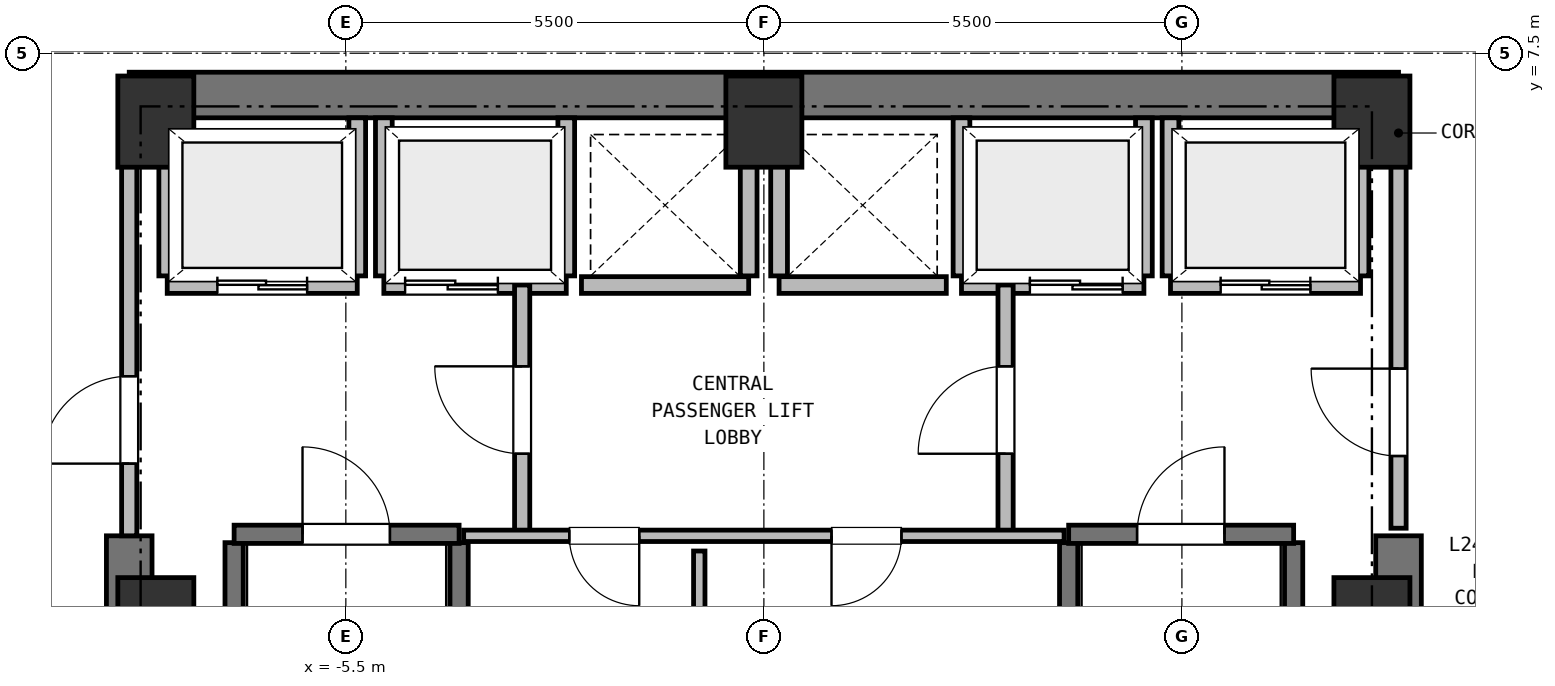
"""IFC4 building model, lengths in metres.
Left out: names, types, materials, properties, quantities, classifications, styles, units other than length and angle.
Written with IfcOpenShell. Run it as: python <this file> out.ifc"""

import sys

from ifc_helpers import new_model, si_unit, direction, frame, frame_2d, origin, origin_2d, place, context, subcontext, project, spatial, rectangle, extrude, element, fill, save


model = new_model("IFC4")
c1 = context("Model", 3, precision=1e-05, world=origin(), true_north=direction((0.0, 1.0)))
c2 = subcontext(c1, "Body", "Model", "MODEL_VIEW")
j1 = project(units=[si_unit("LENGTHUNIT", "METRE"), si_unit("PLANEANGLEUNIT", "RADIAN")], contexts=[c1])
p1 = place(None, origin())
s1 = spatial("IfcSite", under=j1, at=p1, CompositionType="ELEMENT")
p2 = place(p1, origin())
s2 = spatial("IfcBuilding", under=s1, at=p2, CompositionType="ELEMENT")
p3 = place(p2, frame((0.0, 0.0, 101.0)))
s3 = spatial("IfcBuildingStorey", under=s2, at=p3, CompositionType="ELEMENT", Elevation=101.0)
for number, where, z_axis, x_axis in (
    (1, (8.0, 0.0, 0.0), (0.0, 0.0, 1.0), (1.0, 0.0, 0.0)),
    (2, (8.0, 6.6, 0.0), (0.0, 0.0, 1.0), (1.0, 0.0, 0.0)),
    (3, (0.0, 6.6, 0.0), (0.0, 0.0, 1.0), (1.0, 0.0, 0.0)),
    (4, (-8.0, 6.6, 0.0), (0.0, 0.0, 1.0), (1.0, 0.0, 0.0)),
    (5, (-8.0, 0.0, 0.0), (0.0, 0.0, 1.0), (1.0, 0.0, 0.0)),
):
    element("IfcColumn", number, at=place(p3, frame(where, z_axis=z_axis, x_axis=x_axis)), inside=s3, PredefinedType="COLUMN", context=c2, shape_type="SweptSolid", body=[
        extrude(rectangle(XDim=1.0, YDim=1.2, at=origin_2d()), origin(), (0.0, 0.0, 1.0), 3.75),
    ])
p4 = place(p3, frame((-8.35, 6.95, 0.0), z_axis=(0.0, 0.0, 1.0), x_axis=(1.0, 0.0, 0.0)))
e6 = element("IfcWall", 6, at=p4, inside=s3, PredefinedType="SHEAR", context=c2, shape_type="SweptSolid", body=[
    extrude(rectangle(XDim=16.7, YDim=0.6, at=frame_2d((8.35, 0.0))), origin(), (0.0, 0.0, 1.0), 3.5),
])
for number, where, z_axis, x_axis in (
    (7, (-8.35, -6.95, 0.0), (0.0, 0.0, 1.0), (0.0, 1.0, 0.0)),
    (8, (8.35, -6.95, 0.0), (0.0, 0.0, 1.0), (0.0, 1.0, 0.0)),
):
    element("IfcWall", number, at=place(p3, frame(where, z_axis=z_axis, x_axis=x_axis)), inside=s3, PredefinedType="SHEAR", context=c2, shape_type="SweptSolid", body=[
        extrude(rectangle(XDim=8.1, YDim=0.6, at=frame_2d((4.05, 0.0))), origin(), (0.0, 0.0, 1.0), 3.5),
    ])
for number, where, z_axis, x_axis in (
    (9, (-6.97, -6.16, 0.0), (0.0, 0.0, 1.0), (0.0, 1.0, 0.0)),
    (10, (-4.01, -6.16, 0.0), (0.0, 0.0, 1.0), (0.0, 1.0, 0.0)),
):
    element("IfcWall", number, at=place(p3, frame(where, z_axis=z_axis, x_axis=x_axis)), inside=s3, PredefinedType="SHEAR", context=c2, shape_type="SweptSolid", body=[
        extrude(rectangle(XDim=7.22, YDim=0.24, at=frame_2d((3.61, 0.0))), origin(), (0.0, 0.0, 1.0), 3.5),
    ])
p5 = place(p3, frame((-6.97, 1.17, 0.0), z_axis=(0.0, 0.0, 1.0), x_axis=(1.0, 0.0, 0.0)))
e11 = element("IfcWall", 11, at=p5, inside=s3, PredefinedType="SHEAR", context=c2, shape_type="SweptSolid", body=[
    extrude(rectangle(XDim=2.96, YDim=0.24, at=frame_2d((1.48, 0.0))), origin(), (0.0, 0.0, 1.0), 3.5),
])
p6 = place(p5, frame((0.9, 0.0, 0.0)))
e12 = element("IfcOpeningElement", 12, at=p6, cuts=e11, PredefinedType="OPENING", context=c2, shape_type="SweptSolid", body=[
    extrude(rectangle(XDim=1.15, YDim=2.15, at=frame_2d((0.575, 1.075))), frame((0.0, 0.13, 0.0), z_axis=(0.0, -1.0, 0.0), x_axis=(1.0, 0.0, 0.0)), (0.0, 0.0, 1.0), 0.26),
])
for number, where, z_axis, x_axis in (
    (13, (4.01, -6.16, 0.0), (0.0, 0.0, 1.0), (0.0, 1.0, 0.0)),
    (14, (6.97, -6.16, 0.0), (0.0, 0.0, 1.0), (0.0, 1.0, 0.0)),
):
    element("IfcWall", number, at=place(p3, frame(where, z_axis=z_axis, x_axis=x_axis)), inside=s3, PredefinedType="SHEAR", context=c2, shape_type="SweptSolid", body=[
        extrude(rectangle(XDim=7.22, YDim=0.24, at=frame_2d((3.61, 0.0))), origin(), (0.0, 0.0, 1.0), 3.5),
    ])
p7 = place(p3, frame((4.01, 1.17, 0.0), z_axis=(0.0, 0.0, 1.0), x_axis=(1.0, 0.0, 0.0)))
e15 = element("IfcWall", 15, at=p7, inside=s3, PredefinedType="SHEAR", context=c2, shape_type="SweptSolid", body=[
    extrude(rectangle(XDim=2.96, YDim=0.24, at=frame_2d((1.48, 0.0))), origin(), (0.0, 0.0, 1.0), 3.5),
])
p8 = place(p7, frame((0.9, 0.0, 0.0)))
e16 = element("IfcOpeningElement", 16, at=p8, cuts=e15, PredefinedType="OPENING", context=c2, shape_type="SweptSolid", body=[
    extrude(rectangle(XDim=1.15, YDim=2.15, at=frame_2d((0.575, 1.075))), frame((0.0, 0.13, 0.0), z_axis=(0.0, -1.0, 0.0), x_axis=(1.0, 0.0, 0.0)), (0.0, 0.0, 1.0), 0.26),
])
p9 = place(p3, frame((-7.85, 4.45, 0.0), z_axis=(0.0, 0.0, 1.0), x_axis=(1.0, 0.0, 0.0)))
e17 = element("IfcWall", 17, at=p9, inside=s3, PredefinedType="PARTITIONING", context=c2, shape_type="SweptSolid", body=[
    extrude(rectangle(XDim=2.5, YDim=0.22, at=frame_2d((1.25, 0.0))), origin(), (0.0, 0.0, 1.0), 3.5),
])
p10 = place(p9, frame((0.66, 0.0, 0.0)))
e18 = element("IfcOpeningElement", 18, at=p10, cuts=e17, PredefinedType="OPENING", context=c2, shape_type="SweptSolid", body=[
    extrude(rectangle(XDim=1.18, YDim=2.15, at=frame_2d((0.59, 1.075))), frame((0.0, 0.12, 0.0), z_axis=(0.0, -1.0, 0.0), x_axis=(1.0, 0.0, 0.0)), (0.0, 0.0, 1.0), 0.24),
])
p11 = place(p3, frame((-7.85, 4.57, 0.0), z_axis=(0.0, 0.0, 1.0), x_axis=(0.0, 1.0, 0.0)))
e19 = element("IfcWall", 19, at=p11, inside=s3, PredefinedType="PARTITIONING", context=c2, shape_type="SweptSolid", body=[
    extrude(rectangle(XDim=2.08, YDim=0.22, at=frame_2d((1.04, 0.0))), origin(), (0.0, 0.0, 1.0), 3.12),
])
p12 = place(p3, frame((-5.35, 4.57, 0.0), z_axis=(0.0, 0.0, 1.0), x_axis=(0.0, 1.0, 0.0)))
e20 = element("IfcWall", 20, at=p12, inside=s3, PredefinedType="PARTITIONING", context=c2, shape_type="SweptSolid", body=[
    extrude(rectangle(XDim=2.08, YDim=0.22, at=frame_2d((1.04, 0.0))), origin(), (0.0, 0.0, 1.0), 3.5),
])
p13 = place(p3, frame((5.35, 4.45, 0.0), z_axis=(0.0, 0.0, 1.0), x_axis=(1.0, 0.0, 0.0)))
e21 = element("IfcWall", 21, at=p13, inside=s3, PredefinedType="PARTITIONING", context=c2, shape_type="SweptSolid", body=[
    extrude(rectangle(XDim=2.5, YDim=0.22, at=frame_2d((1.25, 0.0))), origin(), (0.0, 0.0, 1.0), 3.5),
])
p14 = place(p13, frame((0.66, 0.0, 0.0)))
e22 = element("IfcOpeningElement", 22, at=p14, cuts=e21, PredefinedType="OPENING", context=c2, shape_type="SweptSolid", body=[
    extrude(rectangle(XDim=1.18, YDim=2.15, at=frame_2d((0.59, 1.075))), frame((0.0, 0.12, 0.0), z_axis=(0.0, -1.0, 0.0), x_axis=(1.0, 0.0, 0.0)), (0.0, 0.0, 1.0), 0.24),
])
p15 = place(p3, frame((5.35, 4.57, 0.0), z_axis=(0.0, 0.0, 1.0), x_axis=(0.0, 1.0, 0.0)))
e23 = element("IfcWall", 23, at=p15, inside=s3, PredefinedType="PARTITIONING", context=c2, shape_type="SweptSolid", body=[
    extrude(rectangle(XDim=2.08, YDim=0.22, at=frame_2d((1.04, 0.0))), origin(), (0.0, 0.0, 1.0), 3.5),
])
p16 = place(p3, frame((7.85, 4.57, 0.0), z_axis=(0.0, 0.0, 1.0), x_axis=(0.0, 1.0, 0.0)))
e24 = element("IfcWall", 24, at=p16, inside=s3, PredefinedType="PARTITIONING", context=c2, shape_type="SweptSolid", body=[
    extrude(rectangle(XDim=2.08, YDim=0.22, at=frame_2d((1.04, 0.0))), origin(), (0.0, 0.0, 1.0), 3.12),
])
p17 = place(p3, frame((-5.0, 4.45, 0.0), z_axis=(0.0, 0.0, 1.0), x_axis=(1.0, 0.0, 0.0)))
e25 = element("IfcWall", 25, at=p17, inside=s3, PredefinedType="PARTITIONING", context=c2, shape_type="SweptSolid", body=[
    extrude(rectangle(XDim=2.4, YDim=0.22, at=frame_2d((1.2, 0.0))), origin(), (0.0, 0.0, 1.0), 3.5),
])
p18 = place(p17, frame((0.28, 0.0, 0.0)))
e26 = element("IfcOpeningElement", 26, at=p18, cuts=e25, PredefinedType="OPENING", context=c2, shape_type="SweptSolid", body=[
    extrude(rectangle(XDim=1.22, YDim=2.15, at=frame_2d((0.61, 1.075))), frame((0.0, 0.12, 0.0), z_axis=(0.0, -1.0, 0.0), x_axis=(1.0, 0.0, 0.0)), (0.0, 0.0, 1.0), 0.24),
])
for number, where, z_axis, x_axis in (
    (27, (-5.0, 4.57, 0.0), (0.0, 0.0, 1.0), (0.0, 1.0, 0.0)),
    (28, (-2.6, 4.57, 0.0), (0.0, 0.0, 1.0), (0.0, 1.0, 0.0)),
):
    element("IfcWall", number, at=place(p3, frame(where, z_axis=z_axis, x_axis=x_axis)), inside=s3, PredefinedType="PARTITIONING", context=c2, shape_type="SweptSolid", body=[
        extrude(rectangle(XDim=2.08, YDim=0.22, at=frame_2d((1.04, 0.0))), origin(), (0.0, 0.0, 1.0), 3.5),
    ])
p19 = place(p3, frame((2.6, 4.45, 0.0), z_axis=(0.0, 0.0, 1.0), x_axis=(1.0, 0.0, 0.0)))
e29 = element("IfcWall", 29, at=p19, inside=s3, PredefinedType="PARTITIONING", context=c2, shape_type="SweptSolid", body=[
    extrude(rectangle(XDim=2.4, YDim=0.22, at=frame_2d((1.2, 0.0))), origin(), (0.0, 0.0, 1.0), 3.5),
])
p20 = place(p19, frame((0.9, 0.0, 0.0)))
e30 = element("IfcOpeningElement", 30, at=p20, cuts=e29, PredefinedType="OPENING", context=c2, shape_type="SweptSolid", body=[
    extrude(rectangle(XDim=1.22, YDim=2.15, at=frame_2d((0.61, 1.075))), frame((0.0, 0.12, 0.0), z_axis=(0.0, -1.0, 0.0), x_axis=(1.0, 0.0, 0.0)), (0.0, 0.0, 1.0), 0.24),
])
for number, where, z_axis, x_axis in (
    (31, (2.6, 4.57, 0.0), (0.0, 0.0, 1.0), (0.0, 1.0, 0.0)),
    (32, (5.0, 4.57, 0.0), (0.0, 0.0, 1.0), (0.0, 1.0, 0.0)),
):
    element("IfcWall", number, at=place(p3, frame(where, z_axis=z_axis, x_axis=x_axis)), inside=s3, PredefinedType="PARTITIONING", context=c2, shape_type="SweptSolid", body=[
        extrude(rectangle(XDim=2.08, YDim=0.22, at=frame_2d((1.04, 0.0))), origin(), (0.0, 0.0, 1.0), 3.5),
    ])
p21 = place(p3, frame((-2.4, 4.45, 0.0), z_axis=(0.0, 0.0, 1.0), x_axis=(1.0, 0.0, 0.0)))
e33 = element("IfcWall", 33, at=p21, inside=s3, PredefinedType="PARTITIONING", context=c2, shape_type="SweptSolid", body=[
    extrude(rectangle(XDim=2.2, YDim=0.22, at=frame_2d((1.1, 0.0))), origin(), (0.0, 0.0, 1.0), 3.5),
])
p22 = place(p3, frame((-0.2, 4.57, 0.0), z_axis=(0.0, 0.0, 1.0), x_axis=(0.0, 1.0, 0.0)))
e34 = element("IfcWall", 34, at=p22, inside=s3, PredefinedType="PARTITIONING", context=c2, shape_type="SweptSolid", body=[
    extrude(rectangle(XDim=2.08, YDim=0.22, at=frame_2d((1.04, 0.0))), origin(), (0.0, 0.0, 1.0), 3.5),
])
p23 = place(p3, frame((0.2, 4.45, 0.0), z_axis=(0.0, 0.0, 1.0), x_axis=(1.0, 0.0, 0.0)))
e35 = element("IfcWall", 35, at=p23, inside=s3, PredefinedType="PARTITIONING", context=c2, shape_type="SweptSolid", body=[
    extrude(rectangle(XDim=2.2, YDim=0.22, at=frame_2d((1.1, 0.0))), origin(), (0.0, 0.0, 1.0), 3.5),
])
p24 = place(p3, frame((0.2, 4.57, 0.0), z_axis=(0.0, 0.0, 1.0), x_axis=(0.0, 1.0, 0.0)))
e36 = element("IfcWall", 36, at=p24, inside=s3, PredefinedType="PARTITIONING", context=c2, shape_type="SweptSolid", body=[
    extrude(rectangle(XDim=2.08, YDim=0.22, at=frame_2d((1.04, 0.0))), origin(), (0.0, 0.0, 1.0), 3.5),
])
p25 = place(p3, frame((-3.18, 1.15, 0.0), z_axis=(0.0, 0.0, 1.0), x_axis=(0.0, 1.0, 0.0)))
e37 = element("IfcWall", 37, at=p25, inside=s3, PredefinedType="PARTITIONING", context=c2, shape_type="SweptSolid", body=[
    extrude(rectangle(XDim=3.3, YDim=0.2, at=frame_2d((1.65, 0.0))), origin(), (0.0, 0.0, 1.0), 3.5),
])
p26 = place(p25, frame((1.08, 0.0, 0.0)))
e38 = element("IfcOpeningElement", 38, at=p26, cuts=e37, PredefinedType="OPENING", context=c2, shape_type="SweptSolid", body=[
    extrude(rectangle(XDim=1.15, YDim=2.15, at=frame_2d((0.575, 1.075))), frame((0.0, 0.11, 0.0), z_axis=(0.0, -1.0, 0.0), x_axis=(1.0, 0.0, 0.0)), (0.0, 0.0, 1.0), 0.22),
])
p27 = place(p3, frame((3.18, 1.15, 0.0), z_axis=(0.0, 0.0, 1.0), x_axis=(0.0, 1.0, 0.0)))
e39 = element("IfcWall", 39, at=p27, inside=s3, PredefinedType="PARTITIONING", context=c2, shape_type="SweptSolid", body=[
    extrude(rectangle(XDim=3.3, YDim=0.2, at=frame_2d((1.65, 0.0))), origin(), (0.0, 0.0, 1.0), 3.5),
])
p28 = place(p27, frame((1.08, 0.0, 0.0)))
e40 = element("IfcOpeningElement", 40, at=p28, cuts=e39, PredefinedType="OPENING", context=c2, shape_type="SweptSolid", body=[
    extrude(rectangle(XDim=1.15, YDim=2.15, at=frame_2d((0.575, 1.075))), frame((0.0, 0.11, 0.0), z_axis=(0.0, -1.0, 0.0), x_axis=(1.0, 0.0, 0.0)), (0.0, 0.0, 1.0), 0.22),
])
p29 = place(p3, frame((-8.35, 1.15, 0.0), z_axis=(0.0, 0.0, 1.0), x_axis=(0.0, 1.0, 0.0)))
e41 = element("IfcWall", 41, at=p29, inside=s3, PredefinedType="PARTITIONING", context=c2, shape_type="SweptSolid", body=[
    extrude(rectangle(XDim=5.4, YDim=0.2, at=frame_2d((2.7, 0.0))), origin(), (0.0, 0.0, 1.0), 3.5),
])
p30 = place(p29, frame((0.95, 0.0, 0.0)))
e42 = element("IfcOpeningElement", 42, at=p30, cuts=e41, PredefinedType="OPENING", context=c2, shape_type="SweptSolid", body=[
    extrude(rectangle(XDim=1.15, YDim=2.15, at=frame_2d((0.575, 1.075))), frame((0.0, 0.11, 0.0), z_axis=(0.0, -1.0, 0.0), x_axis=(1.0, 0.0, 0.0)), (0.0, 0.0, 1.0), 0.22),
])
p31 = place(p3, frame((8.35, 1.25, 0.0), z_axis=(0.0, 0.0, 1.0), x_axis=(0.0, 1.0, 0.0)))
e43 = element("IfcWall", 43, at=p31, inside=s3, PredefinedType="PARTITIONING", context=c2, shape_type="SweptSolid", body=[
    extrude(rectangle(XDim=5.3, YDim=0.2, at=frame_2d((2.65, 0.0))), origin(), (0.0, 0.0, 1.0), 3.5),
])
p32 = place(p31, frame((0.95, 0.0, 0.0)))
e44 = element("IfcOpeningElement", 44, at=p32, cuts=e43, PredefinedType="OPENING", context=c2, shape_type="SweptSolid", body=[
    extrude(rectangle(XDim=1.15, YDim=2.15, at=frame_2d((0.575, 1.075))), frame((0.0, 0.11, 0.0), z_axis=(0.0, -1.0, 0.0), x_axis=(1.0, 0.0, 0.0)), (0.0, 0.0, 1.0), 0.22),
])
p33 = place(p3, frame((3.95, 1.15, 0.0), z_axis=(0.0, 0.0, 1.0), x_axis=(-1.0, 0.0, 0.0)))
e45 = element("IfcWall", 45, at=p33, inside=s3, PredefinedType="PARTITIONING", context=c2, shape_type="SweptSolid", body=[
    extrude(rectangle(XDim=7.9, YDim=0.15, at=frame_2d((3.95, 0.0))), origin(), (0.0, 0.0, 1.0), 3.5),
])
p34 = place(p33, frame((5.59, 0.0, 0.0)))
e46 = element("IfcOpeningElement", 46, at=p34, cuts=e45, PredefinedType="OPENING", context=c2, shape_type="SweptSolid", body=[
    extrude(rectangle(XDim=0.92, YDim=2.05, at=frame_2d((0.46, 1.025))), frame((0.0, 0.085, 0.0), z_axis=(0.0, -1.0, 0.0), x_axis=(1.0, 0.0, 0.0)), (0.0, 0.0, 1.0), 0.17),
])
p35 = place(p33, frame((2.14, 0.0, 0.0)))
e47 = element("IfcOpeningElement", 47, at=p35, cuts=e45, PredefinedType="OPENING", context=c2, shape_type="SweptSolid", body=[
    extrude(rectangle(XDim=0.92, YDim=2.05, at=frame_2d((0.46, 1.025))), frame((0.0, 0.085, 0.0), z_axis=(0.0, -1.0, 0.0), x_axis=(1.0, 0.0, 0.0)), (0.0, 0.0, 1.0), 0.17),
])
p36 = place(p3, frame((-0.85, -6.58, 0.0), z_axis=(0.0, 0.0, 1.0), x_axis=(0.0, 1.0, 0.0)))
e48 = element("IfcWall", 48, at=p36, inside=s3, PredefinedType="PARTITIONING", context=c2, shape_type="SweptSolid", body=[
    extrude(rectangle(XDim=7.53, YDim=0.15, at=frame_2d((3.765, 0.0))), origin(), (0.0, 0.0, 1.0), 3.5),
])
p37 = place(p3, frame((8.678, 9.272, 0.0), z_axis=(0.0, 0.0, 1.0), x_axis=(0.707106781187, -0.707106781187, 0.0)))
e49 = element("IfcWall", 49, at=p37, inside=s3, PredefinedType="PARTITIONING", context=c2, shape_type="SweptSolid", body=[
    extrude(rectangle(XDim=2.89, YDim=0.15, at=frame_2d((1.445, 0.0))), origin(), (0.0, 0.0, 1.0), 3.5),
])
p38 = place(p37, frame((0.28, 0.0, 0.0)))
e50 = element("IfcOpeningElement", 50, at=p38, cuts=e49, PredefinedType="OPENING", context=c2, shape_type="SweptSolid", body=[
    extrude(rectangle(XDim=1.06, YDim=2.15, at=frame_2d((0.53, 1.075))), frame((0.0, 0.085, 0.0), z_axis=(0.0, -1.0, 0.0), x_axis=(1.0, 0.0, 0.0)), (0.0, 0.0, 1.0), 0.17),
])
p39 = place(p3, frame((-10.722, 7.228, 0.0), z_axis=(0.0, 0.0, 1.0), x_axis=(0.707106781187, 0.707106781187, 0.0)))
e51 = element("IfcWall", 51, at=p39, inside=s3, PredefinedType="PARTITIONING", context=c2, shape_type="SweptSolid", body=[
    extrude(rectangle(XDim=2.89, YDim=0.15, at=frame_2d((1.445, 0.0))), origin(), (0.0, 0.0, 1.0), 3.5),
])
p40 = place(p6, origin())
e52 = element("IfcDoor", 52, at=p40, inside=s3, OperationType="SINGLE_SWING_LEFT", PredefinedType="DOOR", context=c2, shape_type="SweptSolid", body=[
    extrude(rectangle(XDim=1.15, YDim=2.15, at=frame_2d((0.575, 1.075))), frame((0.0, 0.025, 0.0), z_axis=(0.0, -1.0, 0.0), x_axis=(1.0, 0.0, 0.0)), (0.0, 0.0, 1.0), 0.05),
])
fill(e12, e52)
p41 = place(p8, origin())
e53 = element("IfcDoor", 53, at=p41, inside=s3, OperationType="SINGLE_SWING_RIGHT", PredefinedType="DOOR", context=c2, shape_type="SweptSolid", body=[
    extrude(rectangle(XDim=1.15, YDim=2.15, at=frame_2d((0.575, 1.075))), frame((0.0, 0.025, 0.0), z_axis=(0.0, -1.0, 0.0), x_axis=(1.0, 0.0, 0.0)), (0.0, 0.0, 1.0), 0.05),
])
fill(e16, e53)
p42 = place(p10, origin())
e54 = element("IfcDoor", 54, at=p42, inside=s3, OperationType="DOUBLE_DOOR_SLIDING", PredefinedType="DOOR", context=c2, shape_type="SweptSolid", body=[
    extrude(rectangle(XDim=1.18, YDim=2.15, at=frame_2d((0.59, 1.075))), frame((0.0, 0.025, 0.0), z_axis=(0.0, -1.0, 0.0), x_axis=(1.0, 0.0, 0.0)), (0.0, 0.0, 1.0), 0.05),
])
fill(e18, e54)
p43 = place(p14, origin())
e55 = element("IfcDoor", 55, at=p43, inside=s3, OperationType="DOUBLE_DOOR_SLIDING", PredefinedType="DOOR", context=c2, shape_type="SweptSolid", body=[
    extrude(rectangle(XDim=1.18, YDim=2.15, at=frame_2d((0.59, 1.075))), frame((0.0, 0.025, 0.0), z_axis=(0.0, -1.0, 0.0), x_axis=(1.0, 0.0, 0.0)), (0.0, 0.0, 1.0), 0.05),
])
fill(e22, e55)
p44 = place(p18, origin())
e56 = element("IfcDoor", 56, at=p44, inside=s3, OperationType="DOUBLE_DOOR_SLIDING", PredefinedType="DOOR", context=c2, shape_type="SweptSolid", body=[
    extrude(rectangle(XDim=1.22, YDim=2.15, at=frame_2d((0.61, 1.075))), frame((0.0, 0.025, 0.0), z_axis=(0.0, -1.0, 0.0), x_axis=(1.0, 0.0, 0.0)), (0.0, 0.0, 1.0), 0.05),
])
fill(e26, e56)
p45 = place(p20, origin())
e57 = element("IfcDoor", 57, at=p45, inside=s3, OperationType="DOUBLE_DOOR_SLIDING", PredefinedType="DOOR", context=c2, shape_type="SweptSolid", body=[
    extrude(rectangle(XDim=1.22, YDim=2.15, at=frame_2d((0.61, 1.075))), frame((0.0, 0.025, 0.0), z_axis=(0.0, -1.0, 0.0), x_axis=(1.0, 0.0, 0.0)), (0.0, 0.0, 1.0), 0.05),
])
fill(e30, e57)
p46 = place(p26, origin())
e58 = element("IfcDoor", 58, at=p46, inside=s3, OperationType="SINGLE_SWING_RIGHT", PredefinedType="DOOR", context=c2, shape_type="SweptSolid", body=[
    extrude(rectangle(XDim=1.15, YDim=2.15, at=frame_2d((0.575, 1.075))), frame((0.0, 0.025, 0.0), z_axis=(0.0, -1.0, 0.0), x_axis=(1.0, 0.0, 0.0)), (0.0, 0.0, 1.0), 0.05),
])
fill(e38, e58)
p47 = place(p28, origin())
e59 = element("IfcDoor", 59, at=p47, inside=s3, OperationType="SINGLE_SWING_LEFT", PredefinedType="DOOR", context=c2, shape_type="SweptSolid", body=[
    extrude(rectangle(XDim=1.15, YDim=2.15, at=frame_2d((0.575, 1.075))), frame((0.0, 0.025, 0.0), z_axis=(0.0, -1.0, 0.0), x_axis=(1.0, 0.0, 0.0)), (0.0, 0.0, 1.0), 0.05),
])
fill(e40, e59)
p48 = place(p30, origin())
e60 = element("IfcDoor", 60, at=p48, inside=s3, OperationType="SINGLE_SWING_LEFT", PredefinedType="DOOR", context=c2, shape_type="SweptSolid", body=[
    extrude(rectangle(XDim=1.15, YDim=2.15, at=frame_2d((0.575, 1.075))), frame((0.0, 0.025, 0.0), z_axis=(0.0, -1.0, 0.0), x_axis=(1.0, 0.0, 0.0)), (0.0, 0.0, 1.0), 0.05),
])
fill(e42, e60)
p49 = place(p32, origin())
e61 = element("IfcDoor", 61, at=p49, inside=s3, OperationType="SINGLE_SWING_RIGHT", PredefinedType="DOOR", context=c2, shape_type="SweptSolid", body=[
    extrude(rectangle(XDim=1.15, YDim=2.15, at=frame_2d((0.575, 1.075))), frame((0.0, 0.025, 0.0), z_axis=(0.0, -1.0, 0.0), x_axis=(1.0, 0.0, 0.0)), (0.0, 0.0, 1.0), 0.05),
])
fill(e44, e61)
p50 = place(p34, origin())
e62 = element("IfcDoor", 62, at=p50, inside=s3, OperationType="SINGLE_SWING_LEFT", PredefinedType="DOOR", context=c2, shape_type="SweptSolid", body=[
    extrude(rectangle(XDim=0.92, YDim=2.05, at=frame_2d((0.46, 1.025))), frame((0.0, 0.025, 0.0), z_axis=(0.0, -1.0, 0.0), x_axis=(1.0, 0.0, 0.0)), (0.0, 0.0, 1.0), 0.05),
])
fill(e46, e62)
p51 = place(p35, origin())
e63 = element("IfcDoor", 63, at=p51, inside=s3, OperationType="SINGLE_SWING_RIGHT", PredefinedType="DOOR", context=c2, shape_type="SweptSolid", body=[
    extrude(rectangle(XDim=0.92, YDim=2.05, at=frame_2d((0.46, 1.025))), frame((0.0, 0.025, 0.0), z_axis=(0.0, -1.0, 0.0), x_axis=(1.0, 0.0, 0.0)), (0.0, 0.0, 1.0), 0.05),
])
fill(e47, e63)
save(model, sys.argv[1])
